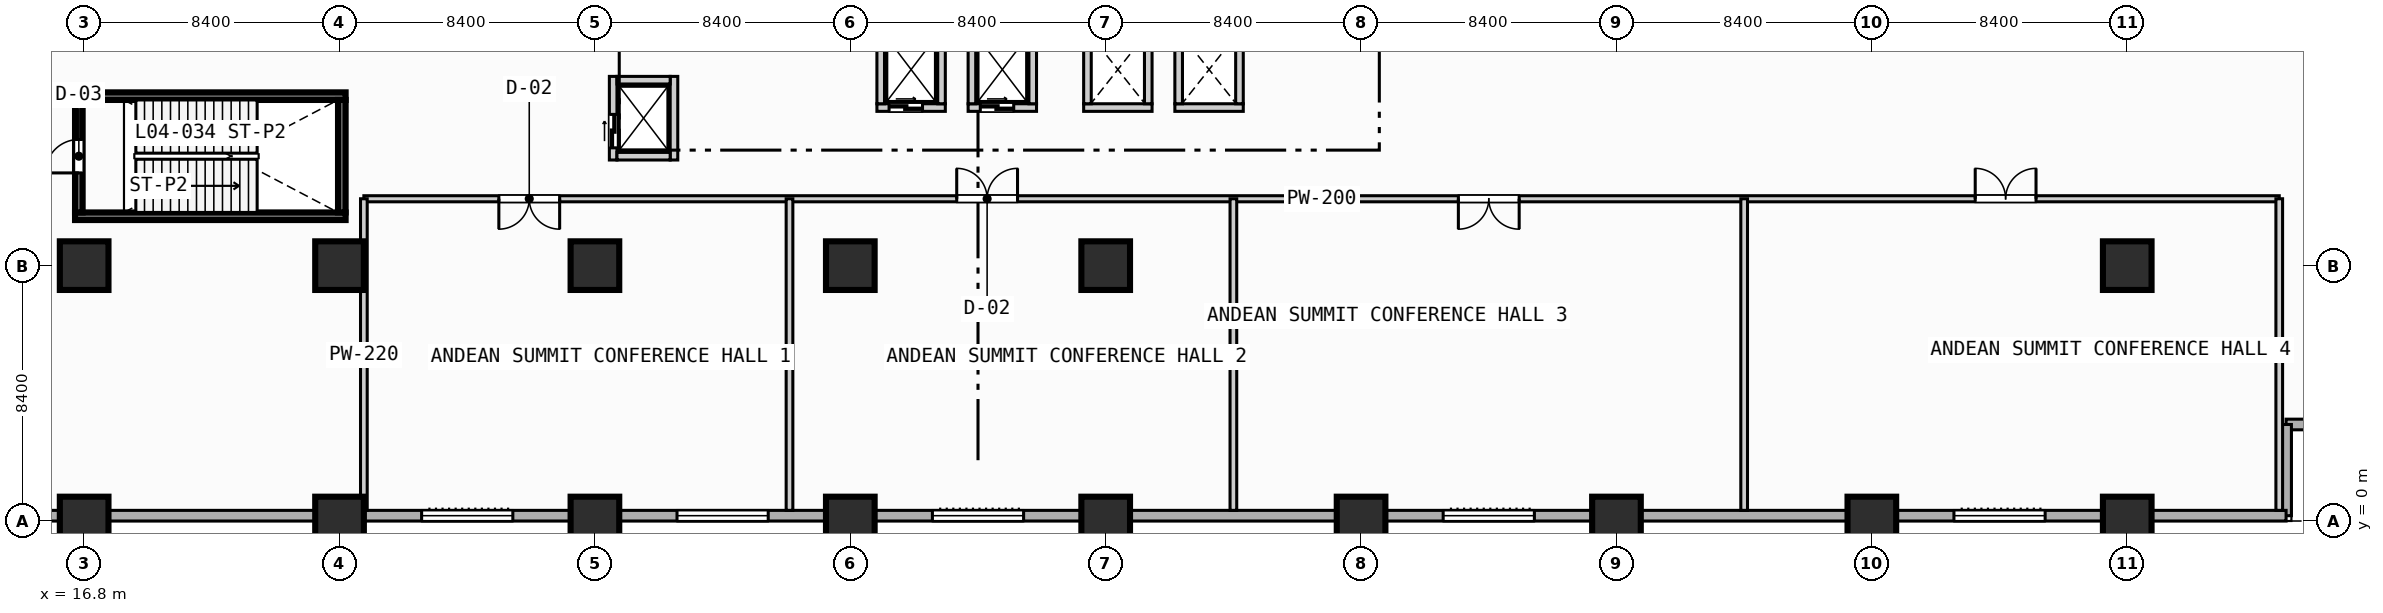
"""IFC4 building model, lengths in metres.
Left out: names, types, materials, properties, quantities, classifications, styles, units other than length and angle.
Written with IfcOpenShell. Run it as: python <this file> out.ifc"""

import sys

from ifc_helpers import new_model, si_unit, direction, frame, frame_2d, origin, origin_2d, place, context, subcontext, project, spatial, rectangle, extrude, element, fill, save


model = new_model("IFC4")
c1 = context("Model", 3, precision=1e-05, world=origin(), true_north=direction((0.0, 1.0)))
c2 = subcontext(c1, "Body", "Model", "MODEL_VIEW")
j1 = project(units=[si_unit("LENGTHUNIT", "METRE"), si_unit("PLANEANGLEUNIT", "RADIAN")], contexts=[c1])
p1 = place(None, origin())
s1 = spatial("IfcSite", under=j1, at=p1, CompositionType="ELEMENT")
p2 = place(p1, origin())
s2 = spatial("IfcBuilding", under=s1, at=p2, CompositionType="ELEMENT")
p3 = place(p2, frame((0.0, 0.0, 20.8)))
s3 = spatial("IfcBuildingStorey", under=s2, at=p3, CompositionType="ELEMENT", Elevation=20.8)
for number, where, z_axis, x_axis in (
    (1, (16.5, 10.025, 0.0), (0.0, 0.0, 1.0), (1.0, 0.0, 0.0)),
    (2, (16.5, 13.975, 0.0), (0.0, 0.0, 1.0), (1.0, 0.0, 0.0)),
):
    element("IfcWall", number, at=place(p3, frame(where, z_axis=z_axis, x_axis=x_axis)), inside=s3, PredefinedType="SOLIDWALL", context=c2, shape_type="SweptSolid", body=[
        extrude(rectangle(XDim=8.9, YDim=0.25, at=frame_2d((4.45, 0.0))), origin(), (0.0, 0.0, 1.0), 4.75),
    ])
p4 = place(p3, frame((25.275, 10.15, 0.0), z_axis=(0.0, 0.0, 1.0), x_axis=(0.0, 1.0, 0.0)))
e3 = element("IfcWall", 3, at=p4, inside=s3, PredefinedType="SOLIDWALL", context=c2, shape_type="SweptSolid", body=[
    extrude(rectangle(XDim=3.7, YDim=0.25, at=frame_2d((1.85, 0.0))), origin(), (0.0, 0.0, 1.0), 4.75),
])
for number, where, z_axis, x_axis in (
    (4, (16.8, 0.0, 0.0), (0.0, 0.0, 1.0), (1.0, 0.0, 0.0)),
    (5, (16.8, 8.4, 0.0), (0.0, 0.0, 1.0), (1.0, 0.0, 0.0)),
    (6, (25.2, 0.0, 0.0), (0.0, 0.0, 1.0), (1.0, 0.0, 0.0)),
    (7, (25.2, 8.4, 0.0), (0.0, 0.0, 1.0), (1.0, 0.0, 0.0)),
    (8, (33.6, 0.0, 0.0), (0.0, 0.0, 1.0), (1.0, 0.0, 0.0)),
    (9, (33.6, 8.4, 0.0), (0.0, 0.0, 1.0), (1.0, 0.0, 0.0)),
    (10, (42.0, 0.0, 0.0), (0.0, 0.0, 1.0), (1.0, 0.0, 0.0)),
    (11, (42.0, 8.4, 0.0), (0.0, 0.0, 1.0), (1.0, 0.0, 0.0)),
    (12, (50.4, 0.0, 0.0), (0.0, 0.0, 1.0), (1.0, 0.0, 0.0)),
    (13, (50.4, 8.4, 0.0), (0.0, 0.0, 1.0), (1.0, 0.0, 0.0)),
    (14, (58.8, 0.0, 0.0), (0.0, 0.0, 1.0), (1.0, 0.0, 0.0)),
    (15, (67.2, 0.0, 0.0), (0.0, 0.0, 1.0), (1.0, 0.0, 0.0)),
    (16, (75.6, 0.0, 0.0), (0.0, 0.0, 1.0), (1.0, 0.0, 0.0)),
    (17, (84.0, 0.0, 0.0), (0.0, 0.0, 1.0), (1.0, 0.0, 0.0)),
    (18, (84.0, 8.4, 0.0), (0.0, 0.0, 1.0), (1.0, 0.0, 0.0)),
):
    element("IfcColumn", number, at=place(p3, frame(where, z_axis=z_axis, x_axis=x_axis)), inside=s3, PredefinedType="COLUMN", context=c2, shape_type="SweptSolid", body=[
        extrude(rectangle(XDim=1.6, YDim=1.6, at=origin_2d()), origin(), (0.0, 0.0, 1.0), 5.2),
    ])
for number, where, z_axis, x_axis in (
    (19, (92.225, 3.175, 0.0), (0.0, 0.0, 1.0), (-1.0, 0.0, 0.0)),
    (20, (89.225, 3.175, 0.0), (0.0, 0.0, 1.0), (0.0, -1.0, 0.0)),
):
    element("IfcWall", number, at=place(p3, frame(where, z_axis=z_axis, x_axis=x_axis)), inside=s3, PredefinedType="STANDARD", context=c2, shape_type="SweptSolid", body=[
        extrude(rectangle(XDim=3.0, YDim=0.35, at=frame_2d((1.5, 0.0))), origin(), (0.0, 0.0, 1.0), 4.75),
    ])
p5 = place(p3, frame((89.225, 0.175, 0.0), z_axis=(0.0, 0.0, 1.0), x_axis=(-1.0, 0.0, 0.0)))
e21 = element("IfcWall", 21, at=p5, inside=s3, PredefinedType="STANDARD", context=c2, shape_type="SweptSolid", body=[
    extrude(rectangle(XDim=86.05, YDim=0.35, at=frame_2d((43.025, 0.0))), origin(), (0.0, 0.0, 1.0), 4.75),
])
p6 = place(p5, frame((58.325, 0.0, 0.85)))
e22 = element("IfcOpeningElement", 22, at=p6, cuts=e21, PredefinedType="OPENING", context=c2, shape_type="SweptSolid", body=[
    extrude(rectangle(XDim=3.0, YDim=2.4, at=frame_2d((1.5, 1.2))), frame((0.0, 0.185, 0.0), z_axis=(0.0, -1.0, 0.0), x_axis=(1.0, 0.0, 0.0)), (0.0, 0.0, 1.0), 0.37),
])
p7 = place(p5, frame((49.925, 0.0, 0.85)))
e23 = element("IfcOpeningElement", 23, at=p7, cuts=e21, PredefinedType="OPENING", context=c2, shape_type="SweptSolid", body=[
    extrude(rectangle(XDim=3.0, YDim=2.4, at=frame_2d((1.5, 1.2))), frame((0.0, 0.185, 0.0), z_axis=(0.0, -1.0, 0.0), x_axis=(1.0, 0.0, 0.0)), (0.0, 0.0, 1.0), 0.37),
])
p8 = place(p5, frame((41.525, 0.0, 0.85)))
e24 = element("IfcOpeningElement", 24, at=p8, cuts=e21, PredefinedType="OPENING", context=c2, shape_type="SweptSolid", body=[
    extrude(rectangle(XDim=3.0, YDim=2.4, at=frame_2d((1.5, 1.2))), frame((0.0, 0.185, 0.0), z_axis=(0.0, -1.0, 0.0), x_axis=(1.0, 0.0, 0.0)), (0.0, 0.0, 1.0), 0.37),
])
p9 = place(p5, frame((24.725, 0.0, 0.85)))
e25 = element("IfcOpeningElement", 25, at=p9, cuts=e21, PredefinedType="OPENING", context=c2, shape_type="SweptSolid", body=[
    extrude(rectangle(XDim=3.0, YDim=2.4, at=frame_2d((1.5, 1.2))), frame((0.0, 0.185, 0.0), z_axis=(0.0, -1.0, 0.0), x_axis=(1.0, 0.0, 0.0)), (0.0, 0.0, 1.0), 0.37),
])
p10 = place(p5, frame((7.925, 0.0, 0.85)))
e26 = element("IfcOpeningElement", 26, at=p10, cuts=e21, PredefinedType="OPENING", context=c2, shape_type="SweptSolid", body=[
    extrude(rectangle(XDim=3.0, YDim=2.4, at=frame_2d((1.5, 1.2))), frame((0.0, 0.185, 0.0), z_axis=(0.0, -1.0, 0.0), x_axis=(1.0, 0.0, 0.0)), (0.0, 0.0, 1.0), 0.37),
])
p11 = place(p3, frame((34.2, 11.875, 0.0), z_axis=(0.0, 0.0, 1.0), x_axis=(0.0, 1.0, 0.0)))
e27 = element("IfcWall", 27, at=p11, inside=s3, PredefinedType="SOLIDWALL", context=c2, shape_type="SweptSolid", body=[
    extrude(rectangle(XDim=2.75, YDim=0.25, at=frame_2d((1.375, 0.0))), origin(), (0.0, 0.0, 1.0), 4.75),
])
p12 = place(p11, frame((0.4, 0.0, 0.0)))
e28 = element("IfcOpeningElement", 28, at=p12, cuts=e27, PredefinedType="OPENING", context=c2, shape_type="SweptSolid", body=[
    extrude(rectangle(XDim=1.1, YDim=2.15, at=frame_2d((0.55, 1.075))), frame((0.0, 0.135, 0.0), z_axis=(0.0, -1.0, 0.0), x_axis=(1.0, 0.0, 0.0)), (0.0, 0.0, 1.0), 0.27),
])
p13 = place(p3, frame((36.2, 11.875, 0.0), z_axis=(0.0, 0.0, 1.0), x_axis=(0.0, 1.0, 0.0)))
e29 = element("IfcWall", 29, at=p13, inside=s3, PredefinedType="SOLIDWALL", context=c2, shape_type="SweptSolid", body=[
    extrude(rectangle(XDim=2.75, YDim=0.25, at=frame_2d((1.375, 0.0))), origin(), (0.0, 0.0, 1.0), 4.75),
])
for number, where, z_axis, x_axis in (
    (30, (34.325, 12.0, 0.0), (0.0, 0.0, 1.0), (1.0, 0.0, 0.0)),
    (31, (34.325, 14.5, 0.0), (0.0, 0.0, 1.0), (1.0, 0.0, 0.0)),
):
    element("IfcWall", number, at=place(p3, frame(where, z_axis=z_axis, x_axis=x_axis)), inside=s3, PredefinedType="SOLIDWALL", context=c2, shape_type="SweptSolid", body=[
        extrude(rectangle(XDim=1.75, YDim=0.25, at=frame_2d((0.875, 0.0))), origin(), (0.0, 0.0, 1.0), 4.75),
    ])
p14 = place(p3, frame((42.875, 13.6, 0.0), z_axis=(0.0, 0.0, 1.0), x_axis=(1.0, 0.0, 0.0)))
e32 = element("IfcWall", 32, at=p14, inside=s3, PredefinedType="SOLIDWALL", context=c2, shape_type="SweptSolid", body=[
    extrude(rectangle(XDim=2.25, YDim=0.25, at=frame_2d((1.125, 0.0))), origin(), (0.0, 0.0, 1.0), 4.75),
])
p15 = place(p14, frame((0.4, 0.0, 0.0)))
e33 = element("IfcOpeningElement", 33, at=p15, cuts=e32, PredefinedType="OPENING", context=c2, shape_type="SweptSolid", body=[
    extrude(rectangle(XDim=1.1, YDim=2.15, at=frame_2d((0.55, 1.075))), frame((0.0, 0.135, 0.0), z_axis=(0.0, -1.0, 0.0), x_axis=(1.0, 0.0, 0.0)), (0.0, 0.0, 1.0), 0.27),
])
for number, where, z_axis, x_axis in (
    (34, (43.0, 13.725, 0.0), (0.0, 0.0, 1.0), (0.0, 1.0, 0.0)),
    (35, (45.0, 13.725, 0.0), (0.0, 0.0, 1.0), (0.0, 1.0, 0.0)),
):
    element("IfcWall", number, at=place(p3, frame(where, z_axis=z_axis, x_axis=x_axis)), inside=s3, PredefinedType="SOLIDWALL", context=c2, shape_type="SweptSolid", body=[
        extrude(rectangle(XDim=2.25, YDim=0.25, at=frame_2d((1.125, 0.0))), origin(), (0.0, 0.0, 1.0), 4.75),
    ])
p16 = place(p3, frame((45.875, 13.6, 0.0), z_axis=(0.0, 0.0, 1.0), x_axis=(1.0, 0.0, 0.0)))
e36 = element("IfcWall", 36, at=p16, inside=s3, PredefinedType="SOLIDWALL", context=c2, shape_type="SweptSolid", body=[
    extrude(rectangle(XDim=2.25, YDim=0.25, at=frame_2d((1.125, 0.0))), origin(), (0.0, 0.0, 1.0), 4.75),
])
p17 = place(p16, frame((0.4, 0.0, 0.0)))
e37 = element("IfcOpeningElement", 37, at=p17, cuts=e36, PredefinedType="OPENING", context=c2, shape_type="SweptSolid", body=[
    extrude(rectangle(XDim=1.1, YDim=2.15, at=frame_2d((0.55, 1.075))), frame((0.0, 0.135, 0.0), z_axis=(0.0, -1.0, 0.0), x_axis=(1.0, 0.0, 0.0)), (0.0, 0.0, 1.0), 0.27),
])
for number, where, z_axis, x_axis in (
    (38, (46.0, 13.725, 0.0), (0.0, 0.0, 1.0), (0.0, 1.0, 0.0)),
    (39, (48.0, 13.725, 0.0), (0.0, 0.0, 1.0), (0.0, 1.0, 0.0)),
    (40, (49.675, 13.6, 0.0), (0.0, 0.0, 1.0), (1.0, 0.0, 0.0)),
    (41, (49.8, 13.725, 0.0), (0.0, 0.0, 1.0), (0.0, 1.0, 0.0)),
    (42, (51.8, 13.725, 0.0), (0.0, 0.0, 1.0), (0.0, 1.0, 0.0)),
    (43, (52.675, 13.6, 0.0), (0.0, 0.0, 1.0), (1.0, 0.0, 0.0)),
    (44, (52.8, 13.725, 0.0), (0.0, 0.0, 1.0), (0.0, 1.0, 0.0)),
    (45, (54.8, 13.725, 0.0), (0.0, 0.0, 1.0), (0.0, 1.0, 0.0)),
):
    element("IfcWall", number, at=place(p3, frame(where, z_axis=z_axis, x_axis=x_axis)), inside=s3, PredefinedType="SOLIDWALL", context=c2, shape_type="SweptSolid", body=[
        extrude(rectangle(XDim=2.25, YDim=0.25, at=frame_2d((1.125, 0.0))), origin(), (0.0, 0.0, 1.0), 4.75),
    ])
p18 = place(p3, frame((16.625, 10.15, 0.0), z_axis=(0.0, 0.0, 1.0), x_axis=(0.0, 1.0, 0.0)))
e46 = element("IfcWall", 46, at=p18, inside=s3, PredefinedType="SOLIDWALL", context=c2, shape_type="SweptSolid", body=[
    extrude(rectangle(XDim=3.7, YDim=0.25, at=frame_2d((1.85, 0.0))), origin(), (0.0, 0.0, 1.0), 4.75),
])
p19 = place(p18, frame((1.3, 0.0, 0.0)))
e47 = element("IfcOpeningElement", 47, at=p19, cuts=e46, PredefinedType="OPENING", context=c2, shape_type="SweptSolid", body=[
    extrude(rectangle(XDim=1.1, YDim=2.15, at=frame_2d((0.55, 1.075))), frame((0.0, 0.135, 0.0), z_axis=(0.0, -1.0, 0.0), x_axis=(1.0, 0.0, 0.0)), (0.0, 0.0, 1.0), 0.27),
])
p20 = place(p3, frame((26.0, 10.6, 0.0), z_axis=(0.0, 0.0, 1.0), x_axis=(1.0, 0.0, 0.0)))
e48 = element("IfcWall", 48, at=p20, inside=s3, PredefinedType="PARTITIONING", context=c2, shape_type="SweptSolid", body=[
    extrude(rectangle(XDim=63.0, YDim=0.2, at=frame_2d((31.5, 0.0))), origin(), (0.0, 0.0, 1.0), 4.75),
])
p21 = place(p20, frame((4.44, 0.0, 0.0)))
e49 = element("IfcOpeningElement", 49, at=p21, cuts=e48, PredefinedType="OPENING", context=c2, shape_type="SweptSolid", body=[
    extrude(rectangle(XDim=2.0, YDim=2.15, at=frame_2d((1.0, 1.075))), frame((0.0, 0.11, 0.0), z_axis=(0.0, -1.0, 0.0), x_axis=(1.0, 0.0, 0.0)), (0.0, 0.0, 1.0), 0.22),
])
p22 = place(p20, frame((19.5, 0.0, 0.0)))
e50 = element("IfcOpeningElement", 50, at=p22, cuts=e48, PredefinedType="OPENING", context=c2, shape_type="SweptSolid", body=[
    extrude(rectangle(XDim=2.0, YDim=2.15, at=frame_2d((1.0, 1.075))), frame((0.0, 0.11, 0.0), z_axis=(0.0, -1.0, 0.0), x_axis=(1.0, 0.0, 0.0)), (0.0, 0.0, 1.0), 0.22),
])
p23 = place(p20, frame((36.0, 0.0, 0.0)))
e51 = element("IfcOpeningElement", 51, at=p23, cuts=e48, PredefinedType="OPENING", context=c2, shape_type="SweptSolid", body=[
    extrude(rectangle(XDim=2.0, YDim=2.15, at=frame_2d((1.0, 1.075))), frame((0.0, 0.11, 0.0), z_axis=(0.0, -1.0, 0.0), x_axis=(1.0, 0.0, 0.0)), (0.0, 0.0, 1.0), 0.22),
])
p24 = place(p20, frame((53.0, 0.0, 0.0)))
e52 = element("IfcOpeningElement", 52, at=p24, cuts=e48, PredefinedType="OPENING", context=c2, shape_type="SweptSolid", body=[
    extrude(rectangle(XDim=2.0, YDim=2.15, at=frame_2d((1.0, 1.075))), frame((0.0, 0.11, 0.0), z_axis=(0.0, -1.0, 0.0), x_axis=(1.0, 0.0, 0.0)), (0.0, 0.0, 1.0), 0.22),
])
for number, where, z_axis, x_axis in (
    (53, (26.0, 0.35, 0.0), (0.0, 0.0, 1.0), (0.0, 1.0, 0.0)),
    (54, (40.0, 0.35, 0.0), (0.0, 0.0, 1.0), (0.0, 1.0, 0.0)),
    (55, (54.6, 0.35, 0.0), (0.0, 0.0, 1.0), (0.0, 1.0, 0.0)),
):
    element("IfcWall", number, at=place(p3, frame(where, z_axis=z_axis, x_axis=x_axis)), inside=s3, PredefinedType="PARTITIONING", context=c2, shape_type="SweptSolid", body=[
        extrude(rectangle(XDim=10.25, YDim=0.22, at=frame_2d((5.125, 0.0))), origin(), (0.0, 0.0, 1.0), 4.75),
    ])
p25 = place(p3, frame((71.4, 0.35, 0.0), z_axis=(0.0, 0.0, 1.0), x_axis=(0.0, 1.0, 0.0)))
e56 = element("IfcWall", 56, at=p25, inside=s3, PredefinedType="PARTITIONING", context=c2, shape_type="SweptSolid", body=[
    extrude(rectangle(XDim=10.25, YDim=0.22, at=frame_2d((5.125, 0.0))), origin(), (0.0, 0.0, 1.0), 4.387),
])
p26 = place(p3, frame((89.0, 0.35, 0.0), z_axis=(0.0, 0.0, 1.0), x_axis=(0.0, 1.0, 0.0)))
e57 = element("IfcWall", 57, at=p26, inside=s3, PredefinedType="PARTITIONING", context=c2, shape_type="SweptSolid", body=[
    extrude(rectangle(XDim=10.25, YDim=0.22, at=frame_2d((5.125, 0.0))), origin(), (0.0, 0.0, 1.0), 4.75),
])
p27 = place(p6, origin())
e58 = element("IfcWindow", 58, at=p27, inside=s3, PartitioningType="SINGLE_PANEL", PredefinedType="WINDOW", context=c2, shape_type="SweptSolid", body=[
    extrude(rectangle(XDim=3.0, YDim=2.4, at=frame_2d((1.5, 1.2))), frame((0.0, 0.03, 0.0), z_axis=(0.0, -1.0, 0.0), x_axis=(1.0, 0.0, 0.0)), (0.0, 0.0, 1.0), 0.06),
])
fill(e22, e58)
p28 = place(p7, origin())
e59 = element("IfcWindow", 59, at=p28, inside=s3, PartitioningType="SINGLE_PANEL", PredefinedType="WINDOW", context=c2, shape_type="SweptSolid", body=[
    extrude(rectangle(XDim=3.0, YDim=2.4, at=frame_2d((1.5, 1.2))), frame((0.0, 0.03, 0.0), z_axis=(0.0, -1.0, 0.0), x_axis=(1.0, 0.0, 0.0)), (0.0, 0.0, 1.0), 0.06),
])
fill(e23, e59)
p29 = place(p8, origin())
e60 = element("IfcWindow", 60, at=p29, inside=s3, PartitioningType="SINGLE_PANEL", PredefinedType="WINDOW", context=c2, shape_type="SweptSolid", body=[
    extrude(rectangle(XDim=3.0, YDim=2.4, at=frame_2d((1.5, 1.2))), frame((0.0, 0.03, 0.0), z_axis=(0.0, -1.0, 0.0), x_axis=(1.0, 0.0, 0.0)), (0.0, 0.0, 1.0), 0.06),
])
fill(e24, e60)
p30 = place(p9, origin())
e61 = element("IfcWindow", 61, at=p30, inside=s3, PartitioningType="SINGLE_PANEL", PredefinedType="WINDOW", context=c2, shape_type="SweptSolid", body=[
    extrude(rectangle(XDim=3.0, YDim=2.4, at=frame_2d((1.5, 1.2))), frame((0.0, 0.03, 0.0), z_axis=(0.0, -1.0, 0.0), x_axis=(1.0, 0.0, 0.0)), (0.0, 0.0, 1.0), 0.06),
])
fill(e25, e61)
p31 = place(p10, origin())
e62 = element("IfcWindow", 62, at=p31, inside=s3, PartitioningType="SINGLE_PANEL", PredefinedType="WINDOW", context=c2, shape_type="SweptSolid", body=[
    extrude(rectangle(XDim=3.0, YDim=2.4, at=frame_2d((1.5, 1.2))), frame((0.0, 0.03, 0.0), z_axis=(0.0, -1.0, 0.0), x_axis=(1.0, 0.0, 0.0)), (0.0, 0.0, 1.0), 0.06),
])
fill(e26, e62)
p32 = place(p12, origin())
e63 = element("IfcDoor", 63, at=p32, inside=s3, OperationType="SLIDING_TO_LEFT", PredefinedType="DOOR", context=c2, shape_type="SweptSolid", body=[
    extrude(rectangle(XDim=1.1, YDim=2.15, at=frame_2d((0.55, 1.075))), frame((0.0, 0.025, 0.0), z_axis=(0.0, -1.0, 0.0), x_axis=(1.0, 0.0, 0.0)), (0.0, 0.0, 1.0), 0.05),
])
fill(e28, e63)
p33 = place(p15, origin())
e64 = element("IfcDoor", 64, at=p33, inside=s3, OperationType="SLIDING_TO_LEFT", PredefinedType="DOOR", context=c2, shape_type="SweptSolid", body=[
    extrude(rectangle(XDim=1.1, YDim=2.15, at=frame_2d((0.55, 1.075))), frame((0.0, 0.025, 0.0), z_axis=(0.0, -1.0, 0.0), x_axis=(1.0, 0.0, 0.0)), (0.0, 0.0, 1.0), 0.05),
])
fill(e33, e64)
p34 = place(p17, origin())
e65 = element("IfcDoor", 65, at=p34, inside=s3, OperationType="SLIDING_TO_LEFT", PredefinedType="DOOR", context=c2, shape_type="SweptSolid", body=[
    extrude(rectangle(XDim=1.1, YDim=2.15, at=frame_2d((0.55, 1.075))), frame((0.0, 0.025, 0.0), z_axis=(0.0, -1.0, 0.0), x_axis=(1.0, 0.0, 0.0)), (0.0, 0.0, 1.0), 0.05),
])
fill(e37, e65)
p35 = place(p19, origin())
e66 = element("IfcDoor", 66, at=p35, inside=s3, OperationType="SINGLE_SWING_LEFT", PredefinedType="DOOR", context=c2, shape_type="SweptSolid", body=[
    extrude(rectangle(XDim=1.1, YDim=2.15, at=frame_2d((0.55, 1.075))), frame((0.0, 0.025, 0.0), z_axis=(0.0, -1.0, 0.0), x_axis=(1.0, 0.0, 0.0)), (0.0, 0.0, 1.0), 0.05),
])
fill(e47, e66)
p36 = place(p21, origin())
e67 = element("IfcDoor", 67, at=p36, inside=s3, OperationType="SINGLE_SWING_RIGHT", PredefinedType="DOOR", context=c2, shape_type="SweptSolid", body=[
    extrude(rectangle(XDim=2.0, YDim=2.15, at=frame_2d((1.0, 1.075))), frame((0.0, 0.025, 0.0), z_axis=(0.0, -1.0, 0.0), x_axis=(1.0, 0.0, 0.0)), (0.0, 0.0, 1.0), 0.05),
])
fill(e49, e67)
p37 = place(p22, origin())
e68 = element("IfcDoor", 68, at=p37, inside=s3, OperationType="SINGLE_SWING_LEFT", PredefinedType="DOOR", context=c2, shape_type="SweptSolid", body=[
    extrude(rectangle(XDim=2.0, YDim=2.15, at=frame_2d((1.0, 1.075))), frame((0.0, 0.025, 0.0), z_axis=(0.0, -1.0, 0.0), x_axis=(1.0, 0.0, 0.0)), (0.0, 0.0, 1.0), 0.05),
])
fill(e50, e68)
p38 = place(p23, origin())
e69 = element("IfcDoor", 69, at=p38, inside=s3, OperationType="SINGLE_SWING_RIGHT", PredefinedType="DOOR", context=c2, shape_type="SweptSolid", body=[
    extrude(rectangle(XDim=2.0, YDim=2.15, at=frame_2d((1.0, 1.075))), frame((0.0, 0.025, 0.0), z_axis=(0.0, -1.0, 0.0), x_axis=(1.0, 0.0, 0.0)), (0.0, 0.0, 1.0), 0.05),
])
fill(e51, e69)
p39 = place(p24, origin())
e70 = element("IfcDoor", 70, at=p39, inside=s3, OperationType="SINGLE_SWING_LEFT", PredefinedType="DOOR", context=c2, shape_type="SweptSolid", body=[
    extrude(rectangle(XDim=2.0, YDim=2.15, at=frame_2d((1.0, 1.075))), frame((0.0, 0.025, 0.0), z_axis=(0.0, -1.0, 0.0), x_axis=(1.0, 0.0, 0.0)), (0.0, 0.0, 1.0), 0.05),
])
fill(e52, e70)
save(model, sys.argv[1])
